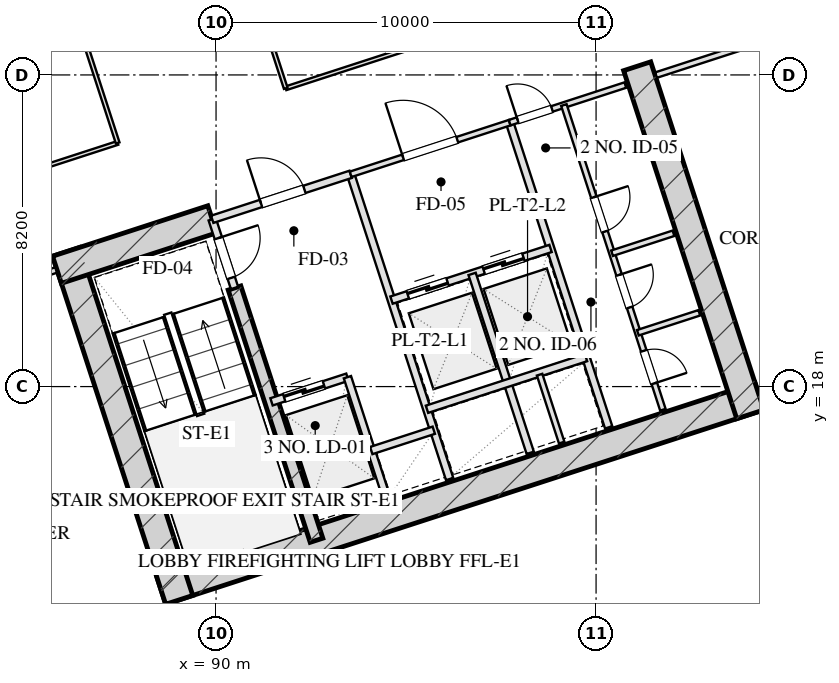
"""IFC4 building model, lengths in metres.
Left out: names, types, materials, properties, quantities, classifications, styles, units other than length and angle.
Written with IfcOpenShell. Run it as: python <this file> out.ifc"""

import sys

from ifc_helpers import new_model, si_unit, direction, frame, frame_2d, origin, place, context, subcontext, project, spatial, rectangle, extrude, element, fill, save


model = new_model("IFC4")
c1 = context("Model", 3, precision=1e-05, world=origin(), true_north=direction((0.0, 1.0)))
c2 = subcontext(c1, "Body", "Model", "MODEL_VIEW")
j1 = project(units=[si_unit("LENGTHUNIT", "METRE"), si_unit("PLANEANGLEUNIT", "RADIAN")], contexts=[c1])
p1 = place(None, origin())
s1 = spatial("IfcSite", under=j1, at=p1, CompositionType="ELEMENT")
p2 = place(p1, origin())
s2 = spatial("IfcBuilding", under=s1, at=p2, CompositionType="ELEMENT")
p3 = place(p2, frame((0.0, 0.0, 78.2)))
s3 = spatial("IfcBuildingStorey", under=s2, at=p3, CompositionType="ELEMENT", Elevation=78.2)
p4 = place(p3, frame((88.559, 12.629, 0.0), z_axis=(0.0, 0.0, 1.0), x_axis=(0.951056072937, 0.309018358888, 0.0)))
e1 = element("IfcWall", 1, at=p4, inside=s3, PredefinedType="SHEAR", context=c2, shape_type="SweptSolid", body=[
    extrude(rectangle(XDim=16.55, YDim=0.75, at=frame_2d((8.275, 0.0))), origin(), (0.0, 0.0, 1.0), 3.45),
])
p5 = place(p3, frame((86.055, 21.546, 0.0), z_axis=(0.0, 0.0, 1.0), x_axis=(0.309023585745, -0.951054374604, 0.0)))
e2 = element("IfcWall", 2, at=p5, inside=s3, PredefinedType="SHEAR", context=c2, shape_type="SweptSolid", body=[
    extrude(rectangle(XDim=9.63, YDim=0.75, at=frame_2d((4.815, 0.0))), origin(), (0.0, 0.0, 1.0), 3.45),
])
p6 = place(p3, frame((101.082, 26.429, 0.0), z_axis=(0.0, 0.0, 1.0), x_axis=(0.309016134813, -0.951056795583, 0.0)))
e3 = element("IfcWall", 3, at=p6, inside=s3, PredefinedType="SHEAR", context=c2, shape_type="SweptSolid", body=[
    extrude(rectangle(XDim=9.63, YDim=0.75, at=frame_2d((4.815, 0.0))), origin(), (0.0, 0.0, 1.0), 3.45),
])
p7 = place(p3, frame((90.486, 20.594, 0.0), z_axis=(0.0, 0.0, 1.0), x_axis=(0.309020428229, -0.951055400562, 0.0)))
e4 = element("IfcWall", 4, at=p7, inside=s3, PredefinedType="SHEAR", context=c2, shape_type="SweptSolid", body=[
    extrude(rectangle(XDim=6.98, YDim=0.35, at=frame_2d((3.49, 0.0))), origin(), (0.0, 0.0, 1.0), 3.45),
])
p8 = place(p3, frame((85.814, 21.074, 0.0), z_axis=(0.0, 0.0, 1.0), x_axis=(0.95106580992, 0.308988390074, 0.0)))
e5 = element("IfcWall", 5, at=p8, inside=s3, PredefinedType="SHEAR", context=c2, shape_type="SweptSolid", body=[
    extrude(rectangle(XDim=4.295, YDim=0.75, at=frame_2d((2.147, 0.0))), origin(), (0.0, 0.0, 1.0), 3.45),
])
p9 = place(p3, frame((99.284, 61.41, 0.0), z_axis=(0.0, 0.0, 1.0), x_axis=(0.309017542002, -0.95105633836, 0.0)))
e6 = element("IfcWall", 6, at=p9, inside=s3, PredefinedType="SOLIDWALL", context=c2, shape_type="SweptSolid", body=[
    extrude(rectangle(XDim=46.4, YDim=0.4, at=frame_2d((23.2, 0.0))), origin(), (0.0, 0.0, 1.0), 2.61),
])
p10 = place(p9, frame((19.596, 0.0, 0.0)))
e7 = element("IfcOpeningElement", 7, at=p10, cuts=e6, PredefinedType="OPENING", context=c2, shape_type="SweptSolid", body=[
    extrude(rectangle(XDim=1.1, YDim=2.15, at=frame_2d((0.55, 1.075))), frame((0.0, 0.21, 0.0), z_axis=(0.0, -1.0, 0.0), x_axis=(1.0, 0.0, 0.0)), (0.0, 0.0, 1.0), 0.42),
])
p11 = place(p3, frame((111.953, 14.005, 0.0), z_axis=(0.0, 0.0, 1.0), x_axis=(-0.95105505922, -0.309021478754, 0.0)))
e8 = element("IfcWall", 8, at=p11, inside=s3, PredefinedType="SOLIDWALL", context=c2, shape_type="SweptSolid", body=[
    extrude(rectangle(XDim=29.4, YDim=0.4, at=frame_2d((14.7, 0.0))), origin(), (0.0, 0.0, 1.0), 2.61),
])
p12 = place(p3, frame((89.899, 22.401, 0.0), z_axis=(0.0, 0.0, 1.0), x_axis=(0.308932062672, -0.951084108086, 0.0)))
e9 = element("IfcWall", 9, at=p12, inside=s3, PredefinedType="PARTITIONING", context=c2, shape_type="SweptSolid", body=[
    extrude(rectangle(XDim=1.9, YDim=0.2, at=frame_2d((0.95, 0.0))), origin(), (0.0, 0.0, 1.0), 3.175),
])
p13 = place(p12, frame((0.52, 0.0, 0.0)))
e10 = element("IfcOpeningElement", 10, at=p13, cuts=e9, PredefinedType="OPENING", context=c2, shape_type="SweptSolid", body=[
    extrude(rectangle(XDim=1.1, YDim=2.05, at=frame_2d((0.55, 1.025))), frame((0.0, 0.11, 0.0), z_axis=(0.0, -1.0, 0.0), x_axis=(1.0, 0.0, 0.0)), (0.0, 0.0, 1.0), 0.22),
])
p14 = place(p3, frame((93.542, 23.585, 0.0), z_axis=(0.0, 0.0, 1.0), x_axis=(0.309042196757, -0.951048327176, 0.0)))
e11 = element("IfcWall", 11, at=p14, inside=s3, PredefinedType="PARTITIONING", context=c2, shape_type="SweptSolid", body=[
    extrude(rectangle(XDim=8.43, YDim=0.2, at=frame_2d((4.215, 0.0))), origin(), (0.0, 0.0, 1.0), 3.175),
])
p15 = place(p3, frame((89.899, 22.401, 0.0), z_axis=(0.0, 0.0, 1.0), x_axis=(0.951046716504, 0.309047153403, 0.0)))
e12 = element("IfcWall", 12, at=p15, inside=s3, PredefinedType="PARTITIONING", context=c2, shape_type="SweptSolid", body=[
    extrude(rectangle(XDim=3.83, YDim=0.2, at=frame_2d((1.915, 0.0))), origin(), (0.0, 0.0, 1.0), 3.175),
])
p16 = place(p15, frame((1.35, 0.0, 0.0)))
e13 = element("IfcOpeningElement", 13, at=p16, cuts=e12, PredefinedType="OPENING", context=c2, shape_type="SweptSolid", body=[
    extrude(rectangle(XDim=1.2, YDim=2.05, at=frame_2d((0.6, 1.025))), frame((0.0, 0.11, 0.0), z_axis=(0.0, -1.0, 0.0), x_axis=(1.0, 0.0, 0.0)), (0.0, 0.0, 1.0), 0.22),
])
p17 = place(p3, frame((91.46, 17.598, 0.0), z_axis=(0.0, 0.0, 1.0), x_axis=(0.951062257173, 0.308999325213, 0.0)))
e14 = element("IfcWall", 14, at=p17, inside=s3, PredefinedType="PARTITIONING", context=c2, shape_type="SweptSolid", body=[
    extrude(rectangle(XDim=2.1, YDim=0.2, at=frame_2d((1.05, 0.0))), origin(), (0.0, 0.0, 1.0), 3.175),
])
p18 = place(p17, frame((0.35, 0.0, 0.0)))
e15 = element("IfcOpeningElement", 15, at=p18, cuts=e14, PredefinedType="OPENING", context=c2, shape_type="SweptSolid", body=[
    extrude(rectangle(XDim=1.1, YDim=2.05, at=frame_2d((0.55, 1.025))), frame((0.0, 0.11, 0.0), z_axis=(0.0, -1.0, 0.0), x_axis=(1.0, 0.0, 0.0)), (0.0, 0.0, 1.0), 0.22),
])
p19 = place(p3, frame((93.457, 18.247, 0.0), z_axis=(0.0, 0.0, 1.0), x_axis=(0.3089935693, -0.951064127245, 0.0)))
e16 = element("IfcWall", 16, at=p19, inside=s3, PredefinedType="PARTITIONING", context=c2, shape_type="SweptSolid", body=[
    extrude(rectangle(XDim=3.7, YDim=0.2, at=frame_2d((1.85, 0.0))), origin(), (0.0, 0.0, 1.0), 3.175),
])
p20 = place(p3, frame((94.084, 16.317, 0.0), z_axis=(0.0, 0.0, 1.0), x_axis=(0.951041328149, 0.309063734775, 0.0)))
e17 = element("IfcWall", 17, at=p20, inside=s3, PredefinedType="PARTITIONING", context=c2, shape_type="SweptSolid", body=[
    extrude(rectangle(XDim=1.73, YDim=0.2, at=frame_2d((0.865, 0.0))), origin(), (0.0, 0.0, 1.0), 3.175),
])
p21 = place(p3, frame((97.727, 24.944, 0.0), z_axis=(0.0, 0.0, 1.0), x_axis=(0.309016001439, -0.951056838919, 0.0)))
e18 = element("IfcWall", 18, at=p21, inside=s3, PredefinedType="PARTITIONING", context=c2, shape_type="SweptSolid", body=[
    extrude(rectangle(XDim=8.43, YDim=0.2, at=frame_2d((4.215, 0.0))), origin(), (0.0, 0.0, 1.0), 3.175),
])
p22 = place(p3, frame((93.542, 23.585, 0.0), z_axis=(0.0, 0.0, 1.0), x_axis=(0.951063829732, 0.308994485023, 0.0)))
e19 = element("IfcWall", 19, at=p22, inside=s3, PredefinedType="PARTITIONING", context=c2, shape_type="SweptSolid", body=[
    extrude(rectangle(XDim=4.4, YDim=0.15, at=frame_2d((2.2, 0.0))), origin(), (0.0, 0.0, 1.0), 3.175),
])
p23 = place(p22, frame((1.45, 0.0, 0.0)))
e20 = element("IfcOpeningElement", 20, at=p23, cuts=e19, PredefinedType="OPENING", context=c2, shape_type="SweptSolid", body=[
    extrude(rectangle(XDim=1.5, YDim=2.05, at=frame_2d((0.75, 1.025))), frame((0.0, 0.085, 0.0), z_axis=(0.0, -1.0, 0.0), x_axis=(1.0, 0.0, 0.0)), (0.0, 0.0, 1.0), 0.17),
])
p24 = place(p3, frame((94.617, 20.275, 0.0), z_axis=(0.0, 0.0, 1.0), x_axis=(0.951058531764, 0.30901079133, 0.0)))
e21 = element("IfcWall", 21, at=p24, inside=s3, PredefinedType="PARTITIONING", context=c2, shape_type="SweptSolid", body=[
    extrude(rectangle(XDim=4.4, YDim=0.2, at=frame_2d((2.2, 0.0))), origin(), (0.0, 0.0, 1.0), 3.175),
])
p25 = place(p24, frame((0.45, 0.0, 0.0)))
e22 = element("IfcOpeningElement", 22, at=p25, cuts=e21, PredefinedType="OPENING", context=c2, shape_type="SweptSolid", body=[
    extrude(rectangle(XDim=1.1, YDim=2.05, at=frame_2d((0.55, 1.025))), frame((0.0, 0.11, 0.0), z_axis=(0.0, -1.0, 0.0), x_axis=(1.0, 0.0, 0.0)), (0.0, 0.0, 1.0), 0.22),
])
p26 = place(p24, frame((2.55, 0.0, 0.0)))
e23 = element("IfcOpeningElement", 23, at=p26, cuts=e21, PredefinedType="OPENING", context=c2, shape_type="SweptSolid", body=[
    extrude(rectangle(XDim=1.1, YDim=2.05, at=frame_2d((0.55, 1.025))), frame((0.0, 0.11, 0.0), z_axis=(0.0, -1.0, 0.0), x_axis=(1.0, 0.0, 0.0)), (0.0, 0.0, 1.0), 0.22),
])
p27 = place(p3, frame((96.738, 20.964, 0.0), z_axis=(0.0, 0.0, 1.0), x_axis=(0.309042578481, -0.951048203135, 0.0)))
e24 = element("IfcWall", 24, at=p27, inside=s3, PredefinedType="PARTITIONING", context=c2, shape_type="SweptSolid", body=[
    extrude(rectangle(XDim=4.95, YDim=0.2, at=frame_2d((2.475, 0.0))), origin(), (0.0, 0.0, 1.0), 3.175),
])
p28 = place(p3, frame((95.551, 17.403, 0.0), z_axis=(0.0, 0.0, 1.0), x_axis=(0.951058531764, 0.30901079133, 0.0)))
e25 = element("IfcWall", 25, at=p28, inside=s3, PredefinedType="PARTITIONING", context=c2, shape_type="SweptSolid", body=[
    extrude(rectangle(XDim=4.4, YDim=0.2, at=frame_2d((2.2, 0.0))), origin(), (0.0, 0.0, 1.0), 3.175),
])
p29 = place(p3, frame((98.514, 18.313, 0.0), z_axis=(0.0, 0.0, 1.0), x_axis=(0.309089008895, -0.951033114345, 0.0)))
e26 = element("IfcWall", 26, at=p29, inside=s3, PredefinedType="PARTITIONING", context=c2, shape_type="SweptSolid", body=[
    extrude(rectangle(XDim=1.88, YDim=0.15, at=frame_2d((0.94, 0.0))), origin(), (0.0, 0.0, 1.0), 3.175),
])
p30 = place(p3, frame((97.727, 24.944, 0.0), z_axis=(0.0, 0.0, 1.0), x_axis=(0.951036872128, 0.309077446369, 0.0)))
e27 = element("IfcWall", 27, at=p30, inside=s3, PredefinedType="PARTITIONING", context=c2, shape_type="SweptSolid", body=[
    extrude(rectangle(XDim=3.2, YDim=0.15, at=frame_2d((1.6, 0.0))), origin(), (0.0, 0.0, 1.0), 3.175),
])
p31 = place(p30, frame((0.22, 0.0, 0.0)))
e28 = element("IfcOpeningElement", 28, at=p31, cuts=e27, PredefinedType="OPENING", context=c2, shape_type="SweptSolid", body=[
    extrude(rectangle(XDim=0.95, YDim=2.05, at=frame_2d((0.475, 1.025))), frame((0.0, 0.085, 0.0), z_axis=(0.0, -1.0, 0.0), x_axis=(1.0, 0.0, 0.0)), (0.0, 0.0, 1.0), 0.17),
])
p32 = place(p3, frame((99.153, 25.408, 0.0), z_axis=(0.0, 0.0, 1.0), x_axis=(0.309016001439, -0.951056838919, 0.0)))
e29 = element("IfcWall", 29, at=p32, inside=s3, PredefinedType="PARTITIONING", context=c2, shape_type="SweptSolid", body=[
    extrude(rectangle(XDim=8.43, YDim=0.15, at=frame_2d((4.215, 0.0))), origin(), (0.0, 0.0, 1.0), 3.175),
])
p33 = place(p32, frame((2.55, 0.0, 0.0)))
e30 = element("IfcOpeningElement", 30, at=p33, cuts=e29, PredefinedType="OPENING", context=c2, shape_type="SweptSolid", body=[
    extrude(rectangle(XDim=0.95, YDim=2.05, at=frame_2d((0.475, 1.025))), frame((0.0, 0.085, 0.0), z_axis=(0.0, -1.0, 0.0), x_axis=(1.0, 0.0, 0.0)), (0.0, 0.0, 1.0), 0.17),
])
p34 = place(p32, frame((4.7, 0.0, 0.0)))
e31 = element("IfcOpeningElement", 31, at=p34, cuts=e29, PredefinedType="OPENING", context=c2, shape_type="SweptSolid", body=[
    extrude(rectangle(XDim=0.9, YDim=2.05, at=frame_2d((0.45, 1.025))), frame((0.0, 0.085, 0.0), z_axis=(0.0, -1.0, 0.0), x_axis=(1.0, 0.0, 0.0)), (0.0, 0.0, 1.0), 0.17),
])
p35 = place(p32, frame((6.8, 0.0, 0.0)))
e32 = element("IfcOpeningElement", 32, at=p35, cuts=e29, PredefinedType="OPENING", context=c2, shape_type="SweptSolid", body=[
    extrude(rectangle(XDim=0.9, YDim=2.05, at=frame_2d((0.45, 1.025))), frame((0.0, 0.085, 0.0), z_axis=(0.0, -1.0, 0.0), x_axis=(1.0, 0.0, 0.0)), (0.0, 0.0, 1.0), 0.17),
])
p36 = place(p3, frame((100.42, 21.509, 0.0), z_axis=(0.0, 0.0, 1.0), x_axis=(0.951040401051, 0.309066587596, 0.0)))
e33 = element("IfcWall", 33, at=p36, inside=s3, PredefinedType="PARTITIONING", context=c2, shape_type="SweptSolid", body=[
    extrude(rectangle(XDim=1.7, YDim=0.15, at=frame_2d((0.85, 0.0))), origin(), (0.0, 0.0, 1.0), 3.175),
])
p37 = place(p3, frame((101.1, 19.416, 0.0), z_axis=(0.0, 0.0, 1.0), x_axis=(0.951054116971, 0.309024378638, 0.0)))
e34 = element("IfcWall", 34, at=p37, inside=s3, PredefinedType="PARTITIONING", context=c2, shape_type="SweptSolid", body=[
    extrude(rectangle(XDim=1.7, YDim=0.15, at=frame_2d((0.85, 0.0))), origin(), (0.0, 0.0, 1.0), 3.175),
])
p38 = place(p3, frame((77.136, 18.254, 0.0), z_axis=(0.0, 0.0, 1.0), x_axis=(0.951057133767, 0.309015093986, 0.0)))
e35 = element("IfcWall", 35, at=p38, inside=s3, PredefinedType="PARTITIONING", context=c2, shape_type="SweptSolid", body=[
    extrude(rectangle(XDim=9.1, YDim=0.15, at=frame_2d((4.55, 0.0))), origin(), (0.0, 0.0, 1.0), 3.175),
])
p39 = place(p38, frame((3.822, 0.0, 0.0)))
e36 = element("IfcOpeningElement", 36, at=p39, cuts=e35, PredefinedType="OPENING", context=c2, shape_type="SweptSolid", body=[
    extrude(rectangle(XDim=1.0, YDim=2.05, at=frame_2d((0.5, 1.025))), frame((0.0, 0.085, 0.0), z_axis=(0.0, -1.0, 0.0), x_axis=(1.0, 0.0, 0.0)), (0.0, 0.0, 1.0), 0.17),
])
p40 = place(p3, frame((101.578, 26.196, 0.0), z_axis=(0.0, 0.0, 1.0), x_axis=(0.951062770994, 0.308997743729, 0.0)))
e37 = element("IfcWall", 37, at=p40, inside=s3, PredefinedType="PARTITIONING", context=c2, shape_type="SweptSolid", body=[
    extrude(rectangle(XDim=8.5, YDim=0.15, at=frame_2d((4.25, 0.0))), origin(), (0.0, 0.0, 1.0), 3.175),
])
p41 = place(p40, frame((3.57, 0.0, 0.0)))
e38 = element("IfcOpeningElement", 38, at=p41, cuts=e37, PredefinedType="OPENING", context=c2, shape_type="SweptSolid", body=[
    extrude(rectangle(XDim=1.05, YDim=2.05, at=frame_2d((0.525, 1.025))), frame((0.0, 0.085, 0.0), z_axis=(0.0, -1.0, 0.0), x_axis=(1.0, 0.0, 0.0)), (0.0, 0.0, 1.0), 0.17),
])
p42 = place(p3, frame((76.308, 20.803, 0.0), z_axis=(0.0, 0.0, 1.0), x_axis=(0.951054504848, 0.309023184905, 0.0)))
e39 = element("IfcWall", 39, at=p42, inside=s3, PredefinedType="MOVABLE", context=c2, shape_type="SweptSolid", body=[
    extrude(rectangle(XDim=11.675, YDim=0.1, at=frame_2d((5.838, 0.0))), origin(), (0.0, 0.0, 1.0), 3.175),
])
p43 = place(p3, frame((91.834, 25.848, 0.0), z_axis=(0.0, 0.0, 1.0), x_axis=(0.951055746746, 0.309019362795, 0.0)))
e40 = element("IfcWall", 40, at=p43, inside=s3, PredefinedType="MOVABLE", context=c2, shape_type="SweptSolid", body=[
    extrude(rectangle(XDim=17.875, YDim=0.1, at=frame_2d((8.938, 0.0))), origin(), (0.0, 0.0, 1.0), 3.175),
])
p44 = place(p3, frame((87.412, 24.411, 0.0), z_axis=(0.0, 0.0, 1.0), x_axis=(-0.309022042254, 0.951054876125, 0.0)))
e41 = element("IfcWall", 41, at=p44, inside=s3, PredefinedType="MOVABLE", context=c2, shape_type="SweptSolid", body=[
    extrude(rectangle(XDim=16.64, YDim=0.1, at=frame_2d((8.32, 0.0))), origin(), (0.0, 0.0, 1.0), 3.175),
])
p45 = place(p44, frame((3.32, 0.0, 0.0)))
e42 = element("IfcOpeningElement", 42, at=p45, cuts=e41, PredefinedType="OPENING", context=c2, shape_type="SweptSolid", body=[
    extrude(rectangle(XDim=1.0, YDim=2.05, at=frame_2d((0.5, 1.025))), frame((0.0, 0.06, 0.0), z_axis=(0.0, -1.0, 0.0), x_axis=(1.0, 0.0, 0.0)), (0.0, 0.0, 1.0), 0.12),
])
p46 = place(p44, frame((11.64, 0.0, 0.0)))
e43 = element("IfcOpeningElement", 43, at=p46, cuts=e41, PredefinedType="OPENING", context=c2, shape_type="SweptSolid", body=[
    extrude(rectangle(XDim=1.0, YDim=2.05, at=frame_2d((0.5, 1.025))), frame((0.0, 0.06, 0.0), z_axis=(0.0, -1.0, 0.0), x_axis=(1.0, 0.0, 0.0)), (0.0, 0.0, 1.0), 0.12),
])
p47 = place(p3, frame((91.834, 25.848, 0.0), z_axis=(0.0, 0.0, 1.0), x_axis=(-0.30901773025, 0.951056277195, 0.0)))
e44 = element("IfcWall", 44, at=p47, inside=s3, PredefinedType="MOVABLE", context=c2, shape_type="SweptSolid", body=[
    extrude(rectangle(XDim=16.64, YDim=0.1, at=frame_2d((8.32, 0.0))), origin(), (0.0, 0.0, 1.0), 3.175),
])
p48 = place(p47, frame((1.16, 0.0, 0.0)))
e45 = element("IfcOpeningElement", 45, at=p48, cuts=e44, PredefinedType="OPENING", context=c2, shape_type="SweptSolid", body=[
    extrude(rectangle(XDim=1.0, YDim=2.05, at=frame_2d((0.5, 1.025))), frame((0.0, 0.06, 0.0), z_axis=(0.0, -1.0, 0.0), x_axis=(1.0, 0.0, 0.0)), (0.0, 0.0, 1.0), 0.12),
])
p49 = place(p47, frame((5.48, 0.0, 0.0)))
e46 = element("IfcOpeningElement", 46, at=p49, cuts=e44, PredefinedType="OPENING", context=c2, shape_type="SweptSolid", body=[
    extrude(rectangle(XDim=1.0, YDim=2.05, at=frame_2d((0.5, 1.025))), frame((0.0, 0.06, 0.0), z_axis=(0.0, -1.0, 0.0), x_axis=(1.0, 0.0, 0.0)), (0.0, 0.0, 1.0), 0.12),
])
p50 = place(p47, frame((8.08, 0.0, 0.0)))
e47 = element("IfcOpeningElement", 47, at=p50, cuts=e44, PredefinedType="OPENING", context=c2, shape_type="SweptSolid", body=[
    extrude(rectangle(XDim=1.05, YDim=2.05, at=frame_2d((0.525, 1.025))), frame((0.0, 0.06, 0.0), z_axis=(0.0, -1.0, 0.0), x_axis=(1.0, 0.0, 0.0)), (0.0, 0.0, 1.0), 0.12),
])
p51 = place(p47, frame((10.874, 0.0, 0.0)))
e48 = element("IfcOpeningElement", 48, at=p51, cuts=e44, PredefinedType="OPENING", context=c2, shape_type="SweptSolid", body=[
    extrude(rectangle(XDim=1.0, YDim=2.05, at=frame_2d((0.5, 1.025))), frame((0.0, 0.06, 0.0), z_axis=(0.0, -1.0, 0.0), x_axis=(1.0, 0.0, 0.0)), (0.0, 0.0, 1.0), 0.12),
])
p52 = place(p47, frame((14.174, 0.0, 0.0)))
e49 = element("IfcOpeningElement", 49, at=p52, cuts=e44, PredefinedType="OPENING", context=c2, shape_type="SweptSolid", body=[
    extrude(rectangle(XDim=1.0, YDim=2.05, at=frame_2d((0.5, 1.025))), frame((0.0, 0.06, 0.0), z_axis=(0.0, -1.0, 0.0), x_axis=(1.0, 0.0, 0.0)), (0.0, 0.0, 1.0), 0.12),
])
p53 = place(p13, origin())
e50 = element("IfcDoor", 50, at=p53, inside=s3, OperationType="SINGLE_SWING_LEFT", PredefinedType="DOOR", context=c2, shape_type="SweptSolid", body=[
    extrude(rectangle(XDim=1.1, YDim=2.05, at=frame_2d((0.55, 1.025))), frame((0.0, 0.025, 0.0), z_axis=(0.0, -1.0, 0.0), x_axis=(1.0, 0.0, 0.0)), (0.0, 0.0, 1.0), 0.05),
])
fill(e10, e50)
p54 = place(p16, origin())
e51 = element("IfcDoor", 51, at=p54, inside=s3, OperationType="SINGLE_SWING_LEFT", PredefinedType="DOOR", context=c2, shape_type="SweptSolid", body=[
    extrude(rectangle(XDim=1.2, YDim=2.05, at=frame_2d((0.6, 1.025))), frame((0.0, 0.025, 0.0), z_axis=(0.0, -1.0, 0.0), x_axis=(1.0, 0.0, 0.0)), (0.0, 0.0, 1.0), 0.05),
])
fill(e13, e51)
p55 = place(p18, origin())
e52 = element("IfcDoor", 52, at=p55, inside=s3, OperationType="DOUBLE_DOOR_SLIDING", PredefinedType="DOOR", context=c2, shape_type="SweptSolid", body=[
    extrude(rectangle(XDim=1.1, YDim=2.05, at=frame_2d((0.55, 1.025))), frame((0.0, 0.025, 0.0), z_axis=(0.0, -1.0, 0.0), x_axis=(1.0, 0.0, 0.0)), (0.0, 0.0, 1.0), 0.05),
])
fill(e15, e52)
p56 = place(p23, origin())
e53 = element("IfcDoor", 53, at=p56, inside=s3, OperationType="SINGLE_SWING_LEFT", PredefinedType="DOOR", context=c2, shape_type="SweptSolid", body=[
    extrude(rectangle(XDim=1.5, YDim=2.05, at=frame_2d((0.75, 1.025))), frame((0.0, 0.025, 0.0), z_axis=(0.0, -1.0, 0.0), x_axis=(1.0, 0.0, 0.0)), (0.0, 0.0, 1.0), 0.05),
])
fill(e20, e53)
p57 = place(p25, origin())
e54 = element("IfcDoor", 54, at=p57, inside=s3, OperationType="DOUBLE_DOOR_SLIDING", PredefinedType="DOOR", context=c2, shape_type="SweptSolid", body=[
    extrude(rectangle(XDim=1.1, YDim=2.05, at=frame_2d((0.55, 1.025))), frame((0.0, 0.025, 0.0), z_axis=(0.0, -1.0, 0.0), x_axis=(1.0, 0.0, 0.0)), (0.0, 0.0, 1.0), 0.05),
])
fill(e22, e54)
p58 = place(p26, origin())
e55 = element("IfcDoor", 55, at=p58, inside=s3, OperationType="DOUBLE_DOOR_SLIDING", PredefinedType="DOOR", context=c2, shape_type="SweptSolid", body=[
    extrude(rectangle(XDim=1.1, YDim=2.05, at=frame_2d((0.55, 1.025))), frame((0.0, 0.025, 0.0), z_axis=(0.0, -1.0, 0.0), x_axis=(1.0, 0.0, 0.0)), (0.0, 0.0, 1.0), 0.05),
])
fill(e23, e55)
p59 = place(p31, origin())
e56 = element("IfcDoor", 56, at=p59, inside=s3, OperationType="SINGLE_SWING_LEFT", PredefinedType="DOOR", context=c2, shape_type="SweptSolid", body=[
    extrude(rectangle(XDim=0.95, YDim=2.05, at=frame_2d((0.475, 1.025))), frame((0.0, 0.025, 0.0), z_axis=(0.0, -1.0, 0.0), x_axis=(1.0, 0.0, 0.0)), (0.0, 0.0, 1.0), 0.05),
])
fill(e28, e56)
p60 = place(p33, origin())
e57 = element("IfcDoor", 57, at=p60, inside=s3, OperationType="SINGLE_SWING_LEFT", PredefinedType="DOOR", context=c2, shape_type="SweptSolid", body=[
    extrude(rectangle(XDim=0.95, YDim=2.05, at=frame_2d((0.475, 1.025))), frame((0.0, 0.025, 0.0), z_axis=(0.0, -1.0, 0.0), x_axis=(1.0, 0.0, 0.0)), (0.0, 0.0, 1.0), 0.05),
])
fill(e30, e57)
p61 = place(p34, origin())
e58 = element("IfcDoor", 58, at=p61, inside=s3, OperationType="SINGLE_SWING_LEFT", PredefinedType="DOOR", context=c2, shape_type="SweptSolid", body=[
    extrude(rectangle(XDim=0.9, YDim=2.05, at=frame_2d((0.45, 1.025))), frame((0.0, 0.025, 0.0), z_axis=(0.0, -1.0, 0.0), x_axis=(1.0, 0.0, 0.0)), (0.0, 0.0, 1.0), 0.05),
])
fill(e31, e58)
p62 = place(p35, origin())
e59 = element("IfcDoor", 59, at=p62, inside=s3, OperationType="SINGLE_SWING_RIGHT", PredefinedType="DOOR", context=c2, shape_type="SweptSolid", body=[
    extrude(rectangle(XDim=0.9, YDim=2.05, at=frame_2d((0.45, 1.025))), frame((0.0, 0.025, 0.0), z_axis=(0.0, -1.0, 0.0), x_axis=(1.0, 0.0, 0.0)), (0.0, 0.0, 1.0), 0.05),
])
fill(e32, e59)
save(model, sys.argv[1])
